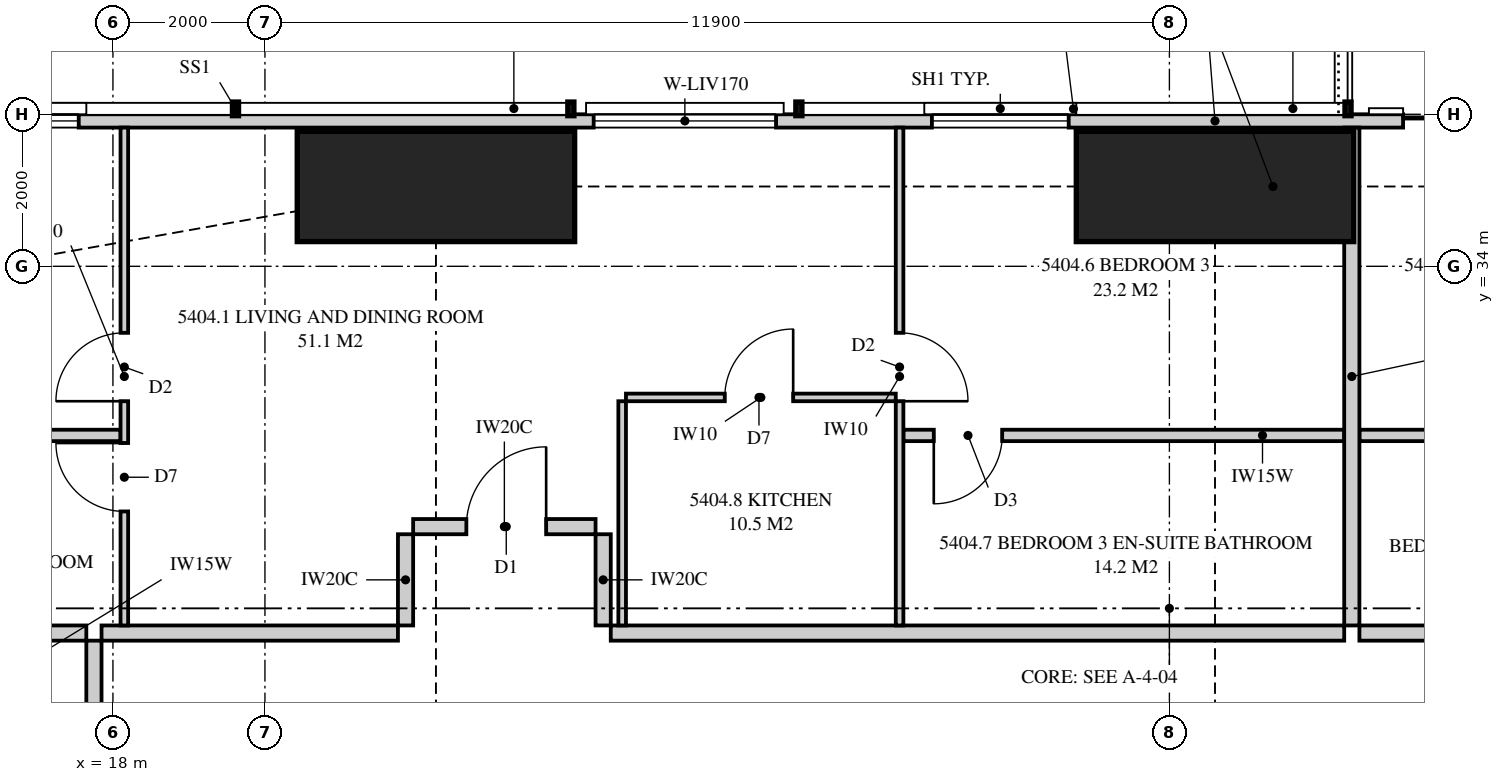
"""IFC4 building model, lengths in metres.
Left out: names, types, materials, properties, quantities, classifications, styles, units other than length and angle.
Written with IfcOpenShell. Run it as: python <this file> out.ifc"""

import sys

from ifc_helpers import new_model, si_unit, direction, frame, frame_2d, origin, origin_2d, place, context, subcontext, project, spatial, polyline, rectangle, outline, extrude, element, fill, save


model = new_model("IFC4")
c1 = context("Model", 3, precision=1e-05, world=origin(), true_north=direction((0.0, 1.0)))
c2 = subcontext(c1, "Body", "Model", "MODEL_VIEW")
j1 = project(units=[si_unit("LENGTHUNIT", "METRE"), si_unit("PLANEANGLEUNIT", "RADIAN")], contexts=[c1])
p1 = place(None, origin())
s1 = spatial("IfcSite", under=j1, at=p1, CompositionType="ELEMENT")
p2 = place(p1, origin())
s2 = spatial("IfcBuilding", under=s1, at=p2, CompositionType="ELEMENT")
p3 = place(p2, frame((0.0, 0.0, 197.9)))
s3 = spatial("IfcBuildingStorey", under=s2, at=p3, CompositionType="ELEMENT", Elevation=197.9)
for number, where, z_axis, x_axis in (
    (1, (32.5, 35.05, 0.0), (0.0, 0.0, 1.0), (0.0, 1.0, 0.0)),
    (2, (22.25, 35.05, 0.0), (0.0, 0.0, 1.0), (0.0, 1.0, 0.0)),
):
    element("IfcColumn", number, at=place(p3, frame(where, z_axis=z_axis, x_axis=x_axis)), inside=s3, PredefinedType="COLUMN", context=c2, shape_type="SweptSolid", body=[
        extrude(rectangle(XDim=1.45, YDim=3.65, at=origin_2d()), origin(), (0.0, 0.0, 1.0), 3.35),
    ])
p4 = place(p3, frame((49.949, 35.913, 0.0), z_axis=(0.0, 0.0, 1.0), x_axis=(-1.0, 0.0, 0.0)))
e3 = element("IfcWall", 3, at=p4, inside=s3, PredefinedType="SOLIDWALL", context=c2, shape_type="SweptSolid", body=[
    extrude(outline(polyline([(0.0, 0.0), (34.897, 0.0), (34.897, 3.11), (27.91, 3.11), (27.91, 2.15), (27.836, 2.15), (27.836, 3.11), (27.699, 3.11), (27.699, 2.15), (7.199, 2.15), (7.199, 3.11), (7.062, 3.11), (7.062, 2.15), (6.987, 2.15), (6.987, 3.11), (0.0, 3.11), (0.0, 0.0)])), frame((0.0, 0.087, 0.0), z_axis=(0.0, -1.0, 0.0), x_axis=(1.0, 0.0, 0.0)), (0.0, 0.0, 1.0), 0.175),
])
p5 = place(p4, frame((2.149, 0.0, 0.4)))
e4 = element("IfcOpeningElement", 4, at=p5, cuts=e3, PredefinedType="OPENING", context=c2, shape_type="SweptSolid", body=[
    extrude(rectangle(XDim=1.8, YDim=1.7, at=frame_2d((0.9, 0.85))), frame((0.0, 0.097, 0.0), z_axis=(0.0, -1.0, 0.0), x_axis=(1.0, 0.0, 0.0)), (0.0, 0.0, 1.0), 0.195),
])
p6 = place(p4, frame((9.636, 0.0, 0.4)))
e5 = element("IfcOpeningElement", 5, at=p6, cuts=e3, PredefinedType="OPENING", context=c2, shape_type="SweptSolid", body=[
    extrude(rectangle(XDim=1.8, YDim=1.7, at=frame_2d((0.9, 0.85))), frame((0.0, 0.097, 0.0), z_axis=(0.0, -1.0, 0.0), x_axis=(1.0, 0.0, 0.0)), (0.0, 0.0, 1.0), 0.195),
])
p7 = place(p4, frame((13.174, 0.0, 0.0)))
e6 = element("IfcOpeningElement", 6, at=p7, cuts=e3, PredefinedType="OPENING", context=c2, shape_type="SweptSolid", body=[
    extrude(rectangle(XDim=1.8, YDim=2.1, at=frame_2d((0.9, 1.05))), frame((0.0, 0.097, 0.0), z_axis=(0.0, -1.0, 0.0), x_axis=(1.0, 0.0, 0.0)), (0.0, 0.0, 1.0), 0.195),
])
p8 = place(p4, frame((19.374, 0.0, 0.4)))
e7 = element("IfcOpeningElement", 7, at=p8, cuts=e3, PredefinedType="OPENING", context=c2, shape_type="SweptSolid", body=[
    extrude(rectangle(XDim=1.8, YDim=1.7, at=frame_2d((0.9, 0.85))), frame((0.0, 0.097, 0.0), z_axis=(0.0, -1.0, 0.0), x_axis=(1.0, 0.0, 0.0)), (0.0, 0.0, 1.0), 0.195),
])
p9 = place(p4, frame((23.224, 0.0, 0.4)))
e8 = element("IfcOpeningElement", 8, at=p9, cuts=e3, PredefinedType="OPENING", context=c2, shape_type="SweptSolid", body=[
    extrude(rectangle(XDim=2.4, YDim=1.7, at=frame_2d((1.2, 0.85))), frame((0.0, 0.097, 0.0), z_axis=(0.0, -1.0, 0.0), x_axis=(1.0, 0.0, 0.0)), (0.0, 0.0, 1.0), 0.195),
])
p10 = place(p4, frame((32.399, 0.0, 0.4)))
e9 = element("IfcOpeningElement", 9, at=p10, cuts=e3, PredefinedType="OPENING", context=c2, shape_type="SweptSolid", body=[
    extrude(rectangle(XDim=1.8, YDim=1.7, at=frame_2d((0.9, 0.85))), frame((0.0, 0.097, 0.0), z_axis=(0.0, -1.0, 0.0), x_axis=(1.0, 0.0, 0.0)), (0.0, 0.0, 1.0), 0.195),
])
p11 = place(p3, frame((34.3, 35.825, 0.0), z_axis=(0.0, 0.0, 1.0), x_axis=(0.0, -1.0, 0.0)))
e10 = element("IfcWall", 10, at=p11, inside=s3, PredefinedType="PARTITIONING", context=c2, shape_type="SweptSolid", body=[
    extrude(outline(polyline([(0.0, 0.0), (6.55, 0.0), (6.55, 3.11), (1.685, 3.11), (1.685, 2.15), (0.0, 2.15), (0.0, 3.11), (0.0, 0.0)])), frame((0.0, 0.1, 0.0), z_axis=(0.0, -1.0, 0.0), x_axis=(1.0, 0.0, 0.0)), (0.0, 0.0, 1.0), 0.2),
])
p12 = place(p3, frame((17.85, 29.175, 0.0), z_axis=(0.0, 0.0, 1.0), x_axis=(1.0, 0.0, 0.0)))
e11 = element("IfcWall", 11, at=p12, inside=s3, PredefinedType="PARTITIONING", context=c2, shape_type="SweptSolid", body=[
    extrude(rectangle(XDim=3.9, YDim=0.2, at=frame_2d((1.95, 0.0))), origin(), (0.0, 0.0, 1.0), 3.11),
])
p13 = place(p3, frame((18.15, 35.825, 0.0), z_axis=(0.0, 0.0, 1.0), x_axis=(0.0, -1.0, 0.0)))
e12 = element("IfcWall", 12, at=p13, inside=s3, PredefinedType="PARTITIONING", context=c2, shape_type="SweptSolid", body=[
    extrude(outline(polyline([(0.0, 0.0), (6.55, 0.0), (6.55, 3.11), (2.374, 3.11), (2.374, 2.15), (0.627, 2.15), (0.627, 3.11), (0.0, 3.11), (0.0, 0.0)])), frame((0.0, 0.05, 0.0), z_axis=(0.0, -1.0, 0.0), x_axis=(1.0, 0.0, 0.0)), (0.0, 0.0, 1.0), 0.1),
])
p14 = place(p13, frame((2.7, 0.0, 0.0)))
e13 = element("IfcOpeningElement", 13, at=p14, cuts=e12, PredefinedType="OPENING", context=c2, shape_type="SweptSolid", body=[
    extrude(rectangle(XDim=0.9, YDim=2.1, at=frame_2d((0.45, 1.05))), frame((0.0, 0.06, 0.0), z_axis=(0.0, -1.0, 0.0), x_axis=(1.0, 0.0, 0.0)), (0.0, 0.0, 1.0), 0.12),
])
p15 = place(p13, frame((4.15, 0.0, 0.0)))
e14 = element("IfcOpeningElement", 14, at=p15, cuts=e12, PredefinedType="OPENING", context=c2, shape_type="SweptSolid", body=[
    extrude(rectangle(XDim=0.9, YDim=2.1, at=frame_2d((0.45, 1.05))), frame((0.0, 0.06, 0.0), z_axis=(0.0, -1.0, 0.0), x_axis=(1.0, 0.0, 0.0)), (0.0, 0.0, 1.0), 0.12),
])
p16 = place(p3, frame((28.35, 35.825, 0.0), z_axis=(0.0, 0.0, 1.0), x_axis=(0.0, -1.0, 0.0)))
e15 = element("IfcWall", 15, at=p16, inside=s3, PredefinedType="PARTITIONING", context=c2, shape_type="SweptSolid", body=[
    extrude(outline(polyline([(0.0, 0.0), (6.55, 0.0), (6.55, 3.11), (1.635, 3.11), (1.635, 2.15), (0.0, 2.15), (0.0, 3.11), (0.0, 0.0)])), frame((0.0, 0.05, 0.0), z_axis=(0.0, -1.0, 0.0), x_axis=(1.0, 0.0, 0.0)), (0.0, 0.0, 1.0), 0.1),
])
p17 = place(p16, frame((2.7, 0.0, 0.0)))
e16 = element("IfcOpeningElement", 16, at=p17, cuts=e15, PredefinedType="OPENING", context=c2, shape_type="SweptSolid", body=[
    extrude(rectangle(XDim=0.9, YDim=2.1, at=frame_2d((0.45, 1.05))), frame((0.0, 0.06, 0.0), z_axis=(0.0, -1.0, 0.0), x_axis=(1.0, 0.0, 0.0)), (0.0, 0.0, 1.0), 0.12),
])
p18 = place(p3, frame((15.2, 31.775, 0.0), z_axis=(0.0, 0.0, 1.0), x_axis=(1.0, 0.0, 0.0)))
e17 = element("IfcWall", 17, at=p18, inside=s3, PredefinedType="PLUMBINGWALL", context=c2, shape_type="SweptSolid", body=[
    extrude(rectangle(XDim=2.9, YDim=0.15, at=frame_2d((1.45, 0.0))), origin(), (0.0, 0.0, 1.0), 3.11),
])
p19 = place(p3, frame((28.4, 31.775, 0.0), z_axis=(0.0, 0.0, 1.0), x_axis=(1.0, 0.0, 0.0)))
e18 = element("IfcWall", 18, at=p19, inside=s3, PredefinedType="PLUMBINGWALL", context=c2, shape_type="SweptSolid", body=[
    extrude(outline(polyline([(0.0, 0.0), (5.8, 0.0), (5.8, 3.11), (4.412, 3.11), (4.412, 2.541), (3.788, 2.541), (3.788, 3.11), (0.0, 3.11), (0.0, 0.0)])), frame((0.0, 0.075, 0.0), z_axis=(0.0, -1.0, 0.0), x_axis=(1.0, 0.0, 0.0)), (0.0, 0.0, 1.0), 0.15),
])
p20 = place(p19, frame((0.4, 0.0, 0.0)))
e19 = element("IfcOpeningElement", 19, at=p20, cuts=e18, PredefinedType="OPENING", context=c2, shape_type="SweptSolid", body=[
    extrude(rectangle(XDim=0.9, YDim=2.1, at=frame_2d((0.45, 1.05))), frame((0.0, 0.085, 0.0), z_axis=(0.0, -1.0, 0.0), x_axis=(1.0, 0.0, 0.0)), (0.0, 0.0, 1.0), 0.17),
])
p21 = place(p3, frame((24.75, 32.275, 0.0), z_axis=(0.0, 0.0, 1.0), x_axis=(1.0, 0.0, 0.0)))
e20 = element("IfcWall", 20, at=p21, inside=s3, PredefinedType="PARTITIONING", context=c2, shape_type="SweptSolid", body=[
    extrude(rectangle(XDim=3.55, YDim=0.1, at=frame_2d((1.775, 0.0))), origin(), (0.0, 0.0, 1.0), 3.11),
])
p22 = place(p21, frame((1.3, 0.0, 0.0)))
e21 = element("IfcOpeningElement", 21, at=p22, cuts=e20, PredefinedType="OPENING", context=c2, shape_type="SweptSolid", body=[
    extrude(rectangle(XDim=0.9, YDim=2.1, at=frame_2d((0.45, 1.05))), frame((0.0, 0.06, 0.0), z_axis=(0.0, -1.0, 0.0), x_axis=(1.0, 0.0, 0.0)), (0.0, 0.0, 1.0), 0.12),
])
p23 = place(p3, frame((24.7, 32.225, 0.0), z_axis=(0.0, 0.0, 1.0), x_axis=(0.0, -1.0, 0.0)))
e22 = element("IfcWall", 22, at=p23, inside=s3, PredefinedType="PARTITIONING", context=c2, shape_type="SweptSolid", body=[
    extrude(rectangle(XDim=2.95, YDim=0.1, at=frame_2d((1.475, 0.0))), origin(), (0.0, 0.0, 1.0), 3.11),
])
p24 = place(p3, frame((34.4, 29.175, 0.0), z_axis=(0.0, 0.0, 1.0), x_axis=(1.0, 0.0, 0.0)))
e23 = element("IfcWall", 23, at=p24, inside=s3, PredefinedType="PARTITIONING", context=c2, shape_type="SweptSolid", body=[
    extrude(rectangle(XDim=7.65, YDim=0.2, at=frame_2d((3.825, 0.0))), origin(), (0.0, 0.0, 1.0), 3.11),
])
p25 = place(p3, frame((34.4, 31.775, 0.0), z_axis=(0.0, 0.0, 1.0), x_axis=(1.0, 0.0, 0.0)))
e24 = element("IfcWall", 24, at=p25, inside=s3, PredefinedType="PLUMBINGWALL", context=c2, shape_type="SweptSolid", body=[
    extrude(rectangle(XDim=3.45, YDim=0.15, at=frame_2d((1.725, 0.0))), origin(), (0.0, 0.0, 1.0), 3.11),
])
p26 = place(p25, frame((2.15, 0.0, 0.0)))
e25 = element("IfcOpeningElement", 25, at=p26, cuts=e24, PredefinedType="OPENING", context=c2, shape_type="SweptSolid", body=[
    extrude(rectangle(XDim=0.9, YDim=2.1, at=frame_2d((0.45, 1.05))), frame((0.0, 0.085, 0.0), z_axis=(0.0, -1.0, 0.0), x_axis=(1.0, 0.0, 0.0)), (0.0, 0.0, 1.0), 0.17),
])
p27 = place(p3, frame((12.0, 29.175, 0.0), z_axis=(0.0, 0.0, 1.0), x_axis=(1.0, 0.0, 0.0)))
e26 = element("IfcWall", 26, at=p27, inside=s3, PredefinedType="PARTITIONING", context=c2, shape_type="SweptSolid", body=[
    extrude(outline(polyline([(0.0, 0.0), (5.65, 0.0), (5.65, 3.11), (2.547, 3.11), (2.547, 2.15), (0.703, 2.15), (0.703, 3.11), (0.0, 3.11), (0.0, 0.0)])), frame((0.0, 0.1, 0.0), z_axis=(0.0, -1.0, 0.0), x_axis=(1.0, 0.0, 0.0)), (0.0, 0.0, 1.0), 0.2),
])
p28 = place(p3, frame((17.75, 7.925, 0.0), z_axis=(0.0, 0.0, 1.0), x_axis=(0.0, 1.0, 0.0)))
e27 = element("IfcWall", 27, at=p28, inside=s3, PredefinedType="PARTITIONING", context=c2, shape_type="SweptSolid", body=[
    extrude(outline(polyline([(0.0, 0.0), (21.15, 0.0), (21.15, 3.11), (17.412, 3.11), (17.412, 2.541), (16.738, 2.541), (16.738, 3.11), (5.412, 3.11), (5.412, 2.541), (4.738, 2.541), (4.738, 3.11), (0.0, 3.11), (0.0, 0.0)])), frame((0.0, 0.1, 0.0), z_axis=(0.0, -1.0, 0.0), x_axis=(1.0, 0.0, 0.0)), (0.0, 0.0, 1.0), 0.2),
])
p29 = place(p28, frame((16.25, 0.0, 0.0)))
e28 = element("IfcOpeningElement", 28, at=p29, cuts=e27, PredefinedType="OPENING", context=c2, shape_type="SweptSolid", body=[
    extrude(rectangle(XDim=1.05, YDim=2.2, at=frame_2d((0.525, 1.1))), frame((0.0, 0.11, 0.0), z_axis=(0.0, -1.0, 0.0), x_axis=(1.0, 0.0, 0.0)), (0.0, 0.0, 1.0), 0.22),
])
p30 = place(p3, frame((24.55, 29.175, 0.0), z_axis=(0.0, 0.0, 1.0), x_axis=(1.0, 0.0, 0.0)))
e29 = element("IfcWall", 29, at=p30, inside=s3, PredefinedType="PARTITIONING", context=c2, shape_type="SweptSolid", body=[
    extrude(outline(polyline([(0.0, 0.0), (9.65, 0.0), (9.65, 3.11), (8.287, 3.11), (8.287, 2.541), (7.613, 2.541), (7.613, 3.11), (0.0, 3.11), (0.0, 0.0)])), frame((0.0, 0.1, 0.0), z_axis=(0.0, -1.0, 0.0), x_axis=(1.0, 0.0, 0.0)), (0.0, 0.0, 1.0), 0.2),
])
p31 = place(p3, frame((21.95, 30.575, 0.0), z_axis=(0.0, 0.0, 1.0), x_axis=(1.0, 0.0, 0.0)))
e30 = element("IfcWall", 30, at=p31, inside=s3, PredefinedType="PARTITIONING", context=c2, shape_type="SweptSolid", body=[
    extrude(outline(polyline([(0.0, 0.0), (2.4, 0.0), (2.4, 3.11), (0.637, 3.11), (0.637, 2.541), (0.0, 2.541), (0.0, 3.11), (0.0, 0.0)])), frame((0.0, 0.1, 0.0), z_axis=(0.0, -1.0, 0.0), x_axis=(1.0, 0.0, 0.0)), (0.0, 0.0, 1.0), 0.2),
])
p32 = place(p31, frame((0.7, 0.0, 0.0)))
e31 = element("IfcOpeningElement", 31, at=p32, cuts=e30, PredefinedType="OPENING", context=c2, shape_type="SweptSolid", body=[
    extrude(rectangle(XDim=1.05, YDim=2.2, at=frame_2d((0.525, 1.1))), frame((0.0, 0.11, 0.0), z_axis=(0.0, -1.0, 0.0), x_axis=(1.0, 0.0, 0.0)), (0.0, 0.0, 1.0), 0.22),
])
for number, where, z_axis, x_axis in (
    (32, (21.85, 29.275, 0.0), (0.0, 0.0, 1.0), (0.0, 1.0, 0.0)),
    (33, (24.45, 29.275, 0.0), (0.0, 0.0, 1.0), (0.0, 1.0, 0.0)),
):
    element("IfcWall", number, at=place(p3, frame(where, z_axis=z_axis, x_axis=x_axis)), inside=s3, PredefinedType="PARTITIONING", context=c2, shape_type="SweptSolid", body=[
        extrude(rectangle(XDim=1.2, YDim=0.2, at=frame_2d((0.6, 0.0))), origin(), (0.0, 0.0, 1.0), 3.11),
    ])
p33 = place(p7, origin())
e34 = element("IfcDoor", 34, at=p33, inside=s3, OperationType="SLIDING_TO_LEFT", PredefinedType="DOOR", context=c2, shape_type="SweptSolid", body=[
    extrude(rectangle(XDim=1.8, YDim=2.1, at=frame_2d((0.9, 1.05))), frame((0.0, 0.025, 0.0), z_axis=(0.0, -1.0, 0.0), x_axis=(1.0, 0.0, 0.0)), (0.0, 0.0, 1.0), 0.05),
])
fill(e6, e34)
p34 = place(p8, origin())
e35 = element("IfcWindow", 35, at=p34, inside=s3, PartitioningType="SINGLE_PANEL", PredefinedType="WINDOW", context=c2, shape_type="SweptSolid", body=[
    extrude(rectangle(XDim=1.8, YDim=1.7, at=frame_2d((0.9, 0.85))), frame((0.0, 0.03, 0.0), z_axis=(0.0, -1.0, 0.0), x_axis=(1.0, 0.0, 0.0)), (0.0, 0.0, 1.0), 0.06),
])
fill(e7, e35)
p35 = place(p9, origin())
e36 = element("IfcWindow", 36, at=p35, inside=s3, PartitioningType="SINGLE_PANEL", PredefinedType="WINDOW", context=c2, shape_type="SweptSolid", body=[
    extrude(rectangle(XDim=2.4, YDim=1.7, at=frame_2d((1.2, 0.85))), frame((0.0, 0.03, 0.0), z_axis=(0.0, -1.0, 0.0), x_axis=(1.0, 0.0, 0.0)), (0.0, 0.0, 1.0), 0.06),
])
fill(e8, e36)
p36 = place(p10, origin())
e37 = element("IfcWindow", 37, at=p36, inside=s3, PartitioningType="SINGLE_PANEL", PredefinedType="WINDOW", context=c2, shape_type="SweptSolid", body=[
    extrude(rectangle(XDim=1.8, YDim=1.7, at=frame_2d((0.9, 0.85))), frame((0.0, 0.03, 0.0), z_axis=(0.0, -1.0, 0.0), x_axis=(1.0, 0.0, 0.0)), (0.0, 0.0, 1.0), 0.06),
])
fill(e9, e37)
p37 = place(p32, origin())
e38 = element("IfcDoor", 38, at=p37, inside=s3, OperationType="SINGLE_SWING_RIGHT", PredefinedType="DOOR", context=c2, shape_type="SweptSolid", body=[
    extrude(rectangle(XDim=1.05, YDim=2.2, at=frame_2d((0.525, 1.1))), frame((0.0, 0.025, 0.0), z_axis=(0.0, -1.0, 0.0), x_axis=(1.0, 0.0, 0.0)), (0.0, 0.0, 1.0), 0.05),
])
fill(e31, e38)
p38 = place(p14, frame((0.9, 0.0, 0.0), z_axis=(0.0, 0.0, 1.0), x_axis=(-1.0, 0.0, 0.0)))
e39 = element("IfcDoor", 39, at=p38, inside=s3, OperationType="SINGLE_SWING_LEFT", PredefinedType="DOOR", context=c2, shape_type="SweptSolid", body=[
    extrude(rectangle(XDim=0.9, YDim=2.1, at=frame_2d((0.45, 1.05))), frame((0.0, 0.025, 0.0), z_axis=(0.0, -1.0, 0.0), x_axis=(1.0, 0.0, 0.0)), (0.0, 0.0, 1.0), 0.05),
])
fill(e13, e39)
p39 = place(p15, frame((0.9, 0.0, 0.0), z_axis=(0.0, 0.0, 1.0), x_axis=(-1.0, 0.0, 0.0)))
e40 = element("IfcDoor", 40, at=p39, inside=s3, OperationType="SINGLE_SWING_RIGHT", PredefinedType="DOOR", context=c2, shape_type="SweptSolid", body=[
    extrude(rectangle(XDim=0.9, YDim=2.1, at=frame_2d((0.45, 1.05))), frame((0.0, 0.025, 0.0), z_axis=(0.0, -1.0, 0.0), x_axis=(1.0, 0.0, 0.0)), (0.0, 0.0, 1.0), 0.05),
])
fill(e14, e40)
p40 = place(p17, origin())
e41 = element("IfcDoor", 41, at=p40, inside=s3, OperationType="SINGLE_SWING_RIGHT", PredefinedType="DOOR", context=c2, shape_type="SweptSolid", body=[
    extrude(rectangle(XDim=0.9, YDim=2.1, at=frame_2d((0.45, 1.05))), frame((0.0, 0.025, 0.0), z_axis=(0.0, -1.0, 0.0), x_axis=(1.0, 0.0, 0.0)), (0.0, 0.0, 1.0), 0.05),
])
fill(e16, e41)
p41 = place(p20, frame((0.9, 0.0, 0.0), z_axis=(0.0, 0.0, 1.0), x_axis=(-1.0, 0.0, 0.0)))
e42 = element("IfcDoor", 42, at=p41, inside=s3, OperationType="SINGLE_SWING_RIGHT", PredefinedType="DOOR", context=c2, shape_type="SweptSolid", body=[
    extrude(rectangle(XDim=0.9, YDim=2.1, at=frame_2d((0.45, 1.05))), frame((0.0, 0.025, 0.0), z_axis=(0.0, -1.0, 0.0), x_axis=(1.0, 0.0, 0.0)), (0.0, 0.0, 1.0), 0.05),
])
fill(e19, e42)
p42 = place(p22, origin())
e43 = element("IfcDoor", 43, at=p42, inside=s3, OperationType="SINGLE_SWING_RIGHT", PredefinedType="DOOR", context=c2, shape_type="SweptSolid", body=[
    extrude(rectangle(XDim=0.9, YDim=2.1, at=frame_2d((0.45, 1.05))), frame((0.0, 0.025, 0.0), z_axis=(0.0, -1.0, 0.0), x_axis=(1.0, 0.0, 0.0)), (0.0, 0.0, 1.0), 0.05),
])
fill(e21, e43)
save(model, sys.argv[1])
